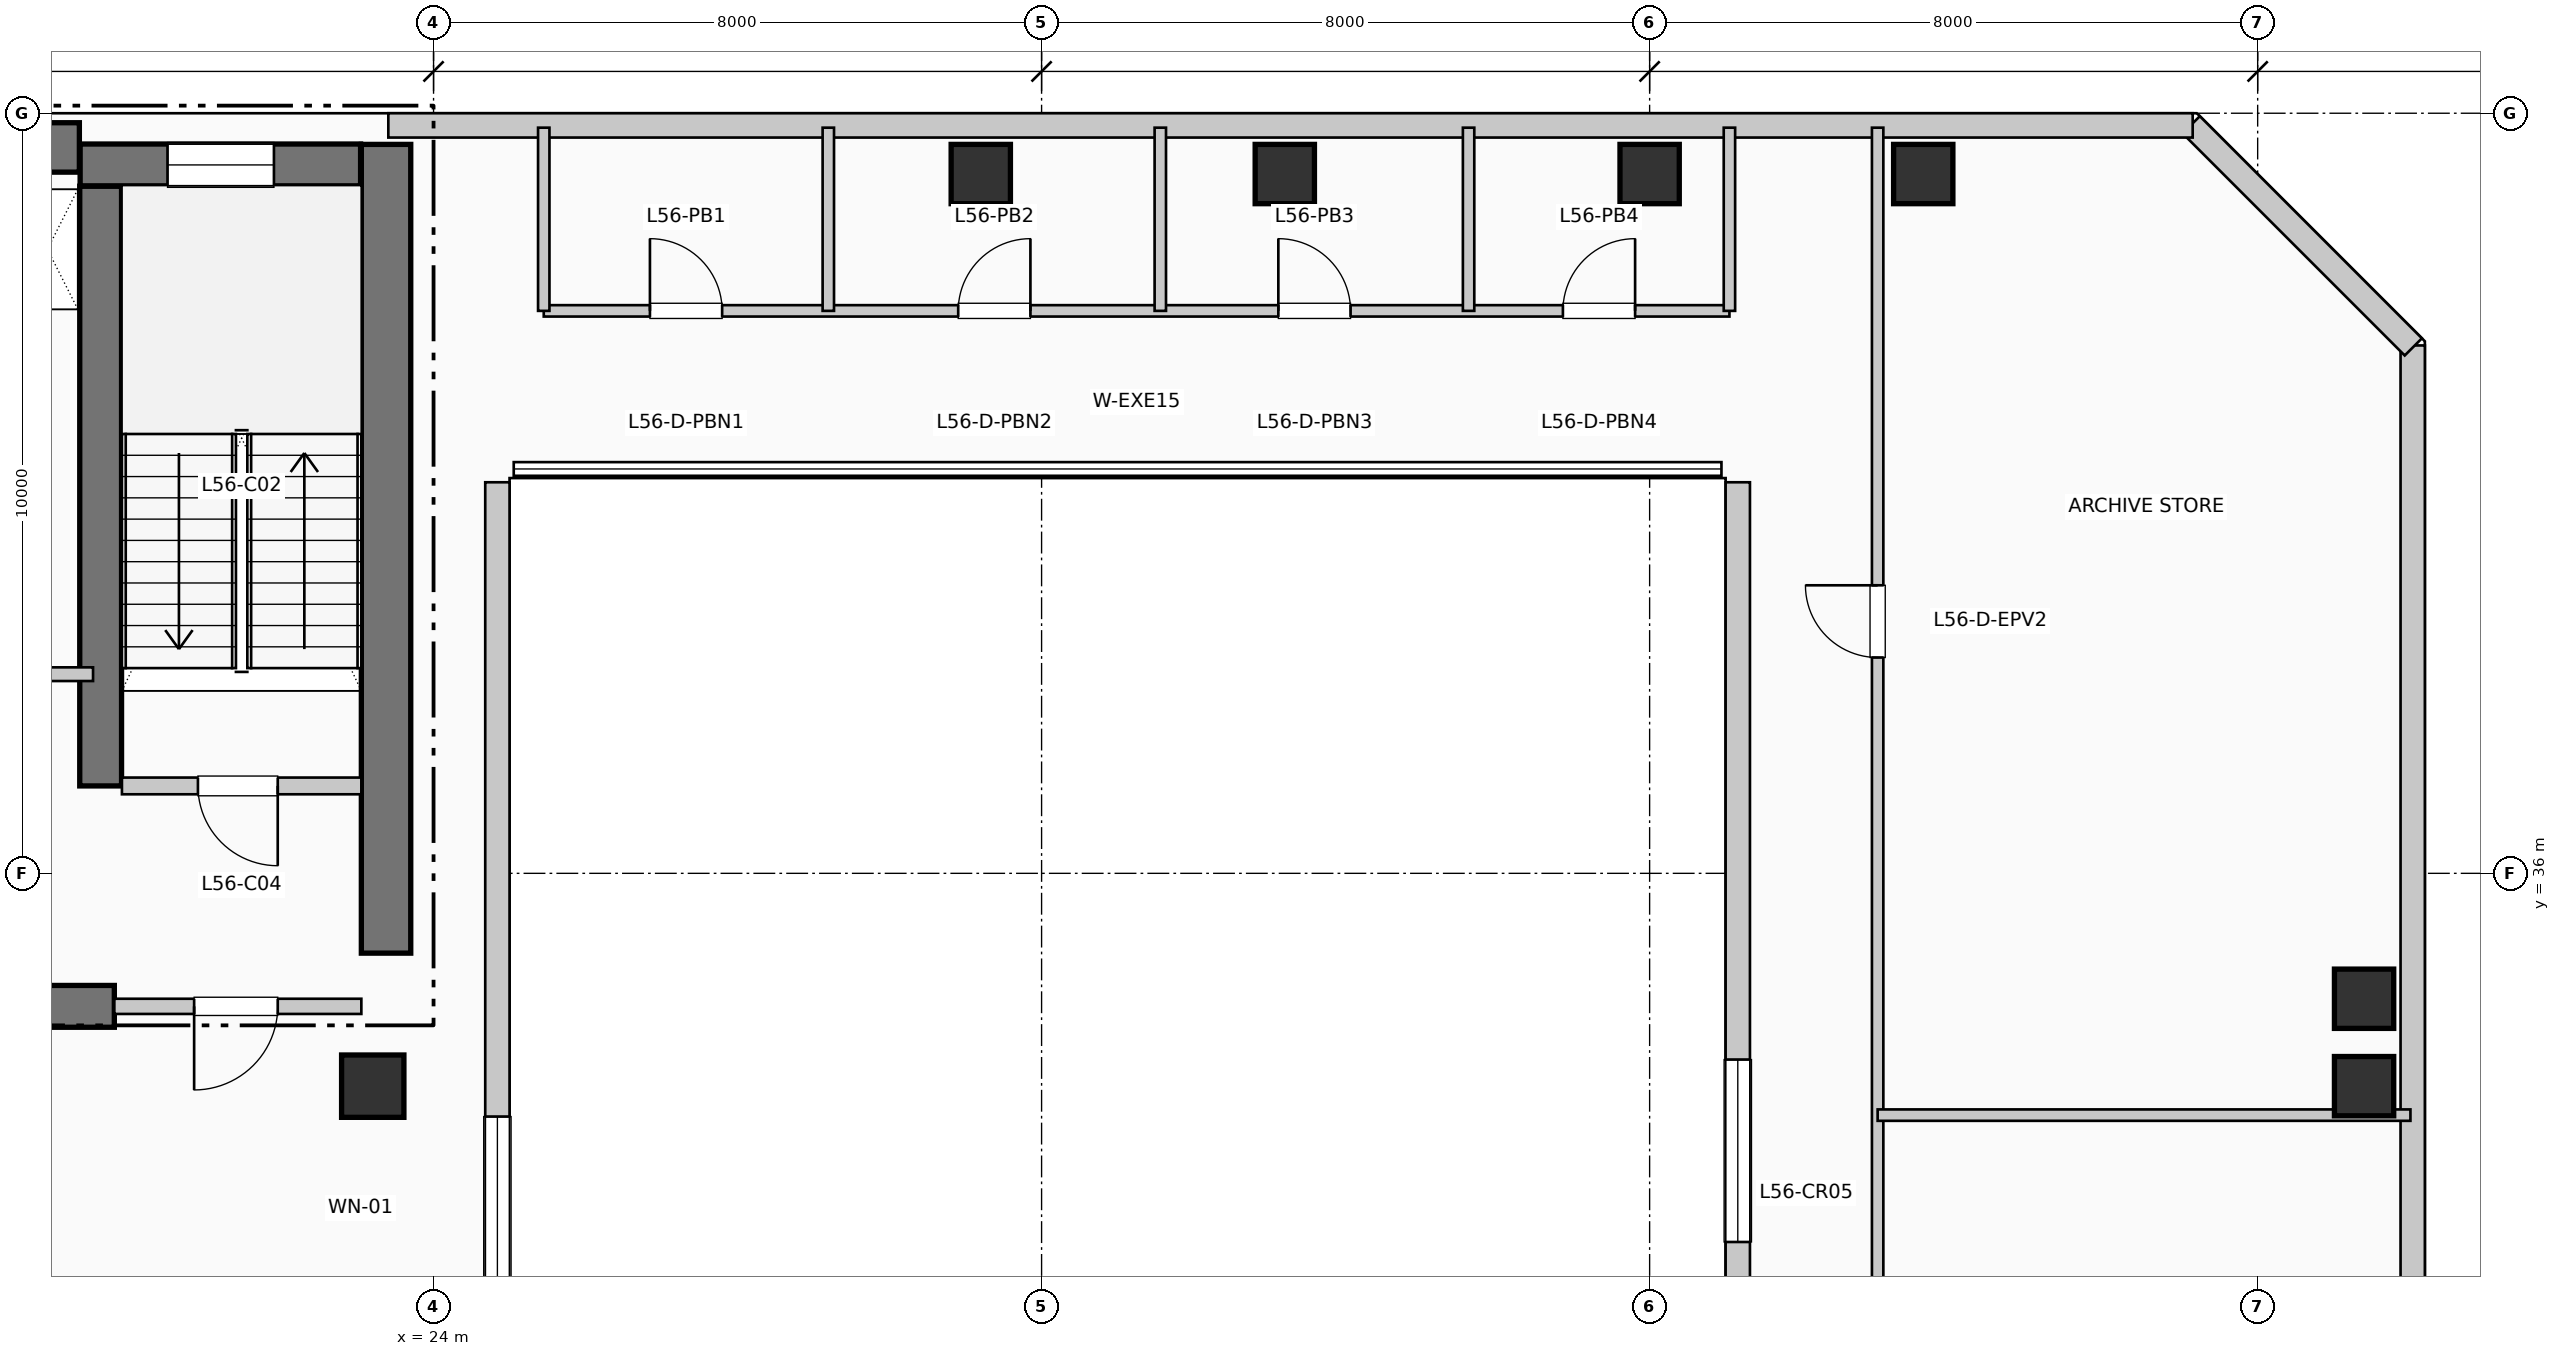
"""IFC4 building model, lengths in metres.
Left out: names, types, materials, properties, quantities, classifications, styles, units other than length and angle.
Written with IfcOpenShell. Run it as: python <this file> out.ifc"""

import sys

from ifc_helpers import new_model, si_unit, direction, frame, frame_2d, origin, origin_2d, place, context, subcontext, project, spatial, rectangle, extrude, element, fill, save


model = new_model("IFC4")
c1 = context("Model", 3, precision=1e-05, world=origin(), true_north=direction((0.0, 1.0)))
c2 = subcontext(c1, "Body", "Model", "MODEL_VIEW")
j1 = project(units=[si_unit("LENGTHUNIT", "METRE"), si_unit("PLANEANGLEUNIT", "RADIAN")], contexts=[c1])
p1 = place(None, origin())
s1 = spatial("IfcSite", under=j1, at=p1, CompositionType="ELEMENT")
p2 = place(p1, origin())
s2 = spatial("IfcBuilding", under=s1, at=p2, CompositionType="ELEMENT")
p3 = place(p2, frame((0.0, 0.0, 231.66)))
s3 = spatial("IfcBuildingStorey", under=s2, at=p3, CompositionType="ELEMENT", Elevation=231.66)
p4 = place(p3, frame((5.36, 45.55, 0.0), z_axis=(0.0, 0.0, 1.0), x_axis=(1.0, 0.0, 0.0)))
e1 = element("IfcWall", 1, at=p4, inside=s3, PredefinedType="SHEAR", context=c2, shape_type="SweptSolid", body=[
    extrude(rectangle(XDim=13.98, YDim=0.65, at=frame_2d((6.99, 0.0))), origin(), (0.0, 0.0, 1.0), 3.96),
])
p5 = place(p3, frame((23.375, 34.95, 0.0), z_axis=(0.0, 0.0, 1.0), x_axis=(0.0, 1.0, 0.0)))
e2 = element("IfcWall", 2, at=p5, inside=s3, PredefinedType="SHEAR", context=c2, shape_type="SweptSolid", body=[
    extrude(rectangle(XDim=10.64, YDim=0.65, at=frame_2d((5.32, 0.0))), origin(), (0.0, 0.0, 1.0), 3.96),
])
p6 = place(p3, frame((13.68, 34.25, 0.0), z_axis=(0.0, 0.0, 1.0), x_axis=(1.0, 0.0, 0.0)))
e3 = element("IfcWall", 3, at=p6, inside=s3, PredefinedType="SHEAR", context=c2, shape_type="SweptSolid", body=[
    extrude(rectangle(XDim=6.12, YDim=0.55, at=frame_2d((3.06, 0.0))), origin(), (0.0, 0.0, 1.0), 3.96),
])
p7 = place(p3, frame((19.62, 37.15, 0.0), z_axis=(0.0, 0.0, 1.0), x_axis=(0.0, 1.0, 0.0)))
e4 = element("IfcWall", 4, at=p7, inside=s3, PredefinedType="SHEAR", context=c2, shape_type="SweptSolid", body=[
    extrude(rectangle(XDim=7.89, YDim=0.55, at=frame_2d((3.945, 0.0))), origin(), (0.0, 0.0, 1.0), 3.96),
])
p8 = place(p3, frame((19.35, 45.32, 0.0), z_axis=(0.0, 0.0, 1.0), x_axis=(1.0, 0.0, 0.0)))
e5 = element("IfcWall", 5, at=p8, inside=s3, PredefinedType="SHEAR", context=c2, shape_type="SweptSolid", body=[
    extrude(rectangle(XDim=3.69, YDim=0.55, at=frame_2d((1.845, 0.0))), origin(), (0.0, 0.0, 1.0), 3.96),
])
p9 = place(p8, frame((1.15, 0.0, 1.05)))
e6 = element("IfcOpeningElement", 6, at=p9, cuts=e5, PredefinedType="OPENING", context=c2, shape_type="SweptSolid", body=[
    extrude(rectangle(XDim=1.4, YDim=1.8, at=frame_2d((0.7, 0.9))), frame((0.0, 0.285, 0.0), z_axis=(0.0, -1.0, 0.0), x_axis=(1.0, 0.0, 0.0)), (0.0, 0.0, 1.0), 0.57),
])
p10 = place(p3, frame((23.2, 33.2, 0.0), z_axis=(0.0, 0.0, 1.0), x_axis=(1.0, 0.0, 0.0)))
e7 = element("IfcColumn", 7, at=p10, inside=s3, PredefinedType="COLUMN", context=c2, shape_type="SweptSolid", body=[
    extrude(rectangle(XDim=0.82, YDim=0.82, at=origin_2d()), origin(), (0.0, 0.0, 1.0), 3.96),
])
for number, where, z_axis, x_axis in (
    (8, (31.2, 45.2, 0.0), (0.0, 0.0, 1.0), (1.0, 0.0, 0.0)),
    (9, (35.2, 45.2, 0.0), (0.0, 0.0, 1.0), (1.0, 0.0, 0.0)),
    (10, (40.0, 45.2, 0.0), (0.0, 0.0, 1.0), (1.0, 0.0, 0.0)),
    (11, (43.6, 45.2, 0.0), (0.0, 0.0, 1.0), (1.0, 0.0, 0.0)),
    (12, (49.4, 33.2, 0.0), (0.0, 0.0, 1.0), (1.0, 0.0, 0.0)),
    (13, (49.4, 34.35, 0.0), (0.0, 0.0, 1.0), (1.0, 0.0, 0.0)),
):
    element("IfcColumn", number, at=place(p3, frame(where, z_axis=z_axis, x_axis=x_axis)), inside=s3, PredefinedType="COLUMN", context=c2, shape_type="SweptSolid", body=[
        extrude(rectangle(XDim=0.78, YDim=0.78, at=origin_2d()), origin(), (0.0, 0.0, 1.0), 3.96),
    ])
p11 = place(p3, frame((24.84, 22.055, 0.0), z_axis=(0.0, 0.0, 1.0), x_axis=(0.0, 1.0, 0.0)))
e14 = element("IfcWall", 14, at=p11, inside=s3, PredefinedType="SOLIDWALL", context=c2, shape_type="SweptSolid", body=[
    extrude(rectangle(XDim=19.09, YDim=0.32, at=frame_2d((9.545, 0.0))), origin(), (0.0, 0.0, 1.0), 3.71),
])
p12 = place(p11, frame((8.345, 0.0, 0.85)))
e15 = element("IfcOpeningElement", 15, at=p12, cuts=e14, PredefinedType="OPENING", context=c2, shape_type="SweptSolid", body=[
    extrude(rectangle(XDim=2.4, YDim=2.05, at=frame_2d((1.2, 1.025))), frame((0.0, 0.17, 0.0), z_axis=(0.0, -1.0, 0.0), x_axis=(1.0, 0.0, 0.0)), (0.0, 0.0, 1.0), 0.34),
])
p13 = place(p3, frame((41.16, 41.145, 0.0), z_axis=(0.0, 0.0, 1.0), x_axis=(0.0, -1.0, 0.0)))
e16 = element("IfcWall", 16, at=p13, inside=s3, PredefinedType="SOLIDWALL", context=c2, shape_type="SweptSolid", body=[
    extrude(rectangle(XDim=17.59, YDim=0.32, at=frame_2d((8.795, 0.0))), origin(), (0.0, 0.0, 1.0), 3.71),
])
p14 = place(p13, frame((7.595, 0.0, 0.85)))
e17 = element("IfcOpeningElement", 17, at=p14, cuts=e16, PredefinedType="OPENING", context=c2, shape_type="SweptSolid", body=[
    extrude(rectangle(XDim=2.4, YDim=2.05, at=frame_2d((1.2, 1.025))), frame((0.0, 0.17, 0.0), z_axis=(0.0, -1.0, 0.0), x_axis=(1.0, 0.0, 0.0)), (0.0, 0.0, 1.0), 0.34),
])
p15 = place(p3, frame((50.04, 25.055, 0.0), z_axis=(0.0, 0.0, 1.0), x_axis=(0.0, 1.0, 0.0)))
e18 = element("IfcWall", 18, at=p15, inside=s3, PredefinedType="SOLIDWALL", context=c2, shape_type="SweptSolid", body=[
    extrude(rectangle(XDim=17.89, YDim=0.32, at=frame_2d((8.945, 0.0))), origin(), (0.0, 0.0, 1.0), 3.71),
])
p16 = place(p3, frame((50.048, 42.926, 0.0), z_axis=(0.0, 0.0, 1.0), x_axis=(-0.707136318428, 0.707077242712, 0.0)))
e19 = element("IfcWall", 19, at=p16, inside=s3, PredefinedType="SOLIDWALL", context=c2, shape_type="SweptSolid", body=[
    extrude(rectangle(XDim=4.133, YDim=0.32, at=frame_2d((2.066, 0.0))), origin(), (0.0, 0.0, 1.0), 3.71),
])
p17 = place(p3, frame((47.145, 45.84, 0.0), z_axis=(0.0, 0.0, 1.0), x_axis=(-1.0, 0.0, 0.0)))
e20 = element("IfcWall", 20, at=p17, inside=s3, PredefinedType="SOLIDWALL", context=c2, shape_type="SweptSolid", body=[
    extrude(rectangle(XDim=23.74, YDim=0.32, at=frame_2d((11.87, 0.0))), origin(), (0.0, 0.0, 1.0), 3.71),
])
p18 = place(p3, frame((19.9, 37.15, 0.0), z_axis=(0.0, 0.0, 1.0), x_axis=(1.0, 0.0, 0.0)))
e21 = element("IfcWall", 21, at=p18, inside=s3, PredefinedType="PARTITIONING", context=c2, shape_type="SweptSolid", body=[
    extrude(rectangle(XDim=3.15, YDim=0.22, at=frame_2d((1.575, 0.0))), origin(), (0.0, 0.0, 1.0), 3.71),
])
p19 = place(p18, frame((2.05, 0.0, 0.0), z_axis=(0.0, 0.0, 1.0), x_axis=(-1.0, 0.0, 0.0)))
e22 = element("IfcOpeningElement", 22, at=p19, cuts=e21, PredefinedType="OPENING", context=c2, shape_type="SweptSolid", body=[
    extrude(rectangle(XDim=1.05, YDim=2.15, at=frame_2d((0.525, 1.075))), frame((0.0, 0.12, 0.0), z_axis=(0.0, -1.0, 0.0), x_axis=(1.0, 0.0, 0.0)), (0.0, 0.0, 1.0), 0.24),
])
p20 = place(p3, frame((19.8, 34.25, 0.0), z_axis=(0.0, 0.0, 1.0), x_axis=(1.0, 0.0, 0.0)))
e23 = element("IfcWall", 23, at=p20, inside=s3, PredefinedType="PARTITIONING", context=c2, shape_type="SweptSolid", body=[
    extrude(rectangle(XDim=3.25, YDim=0.2, at=frame_2d((1.625, 0.0))), origin(), (0.0, 0.0, 1.0), 3.71),
])
p21 = place(p20, frame((2.15, 0.0, 0.0), z_axis=(0.0, 0.0, 1.0), x_axis=(-1.0, 0.0, 0.0)))
e24 = element("IfcOpeningElement", 24, at=p21, cuts=e23, PredefinedType="OPENING", context=c2, shape_type="SweptSolid", body=[
    extrude(rectangle(XDim=1.1, YDim=2.15, at=frame_2d((0.55, 1.075))), frame((0.0, 0.11, 0.0), z_axis=(0.0, -1.0, 0.0), x_axis=(1.0, 0.0, 0.0)), (0.0, 0.0, 1.0), 0.22),
])
p22 = place(p3, frame((17.68, 38.62, 0.0), z_axis=(0.0, 0.0, 1.0), x_axis=(1.0, 0.0, 0.0)))
e25 = element("IfcWall", 25, at=p22, inside=s3, PredefinedType="PARTITIONING", context=c2, shape_type="SweptSolid", body=[
    extrude(rectangle(XDim=1.84, YDim=0.18, at=frame_2d((0.92, 0.0))), origin(), (0.0, 0.0, 1.0), 3.71),
])
p23 = place(p22, frame((0.24, 0.0, 0.0)))
e26 = element("IfcOpeningElement", 26, at=p23, cuts=e25, PredefinedType="OPENING", context=c2, shape_type="SweptSolid", body=[
    extrude(rectangle(XDim=0.92, YDim=2.1, at=frame_2d((0.46, 1.05))), frame((0.0, 0.1, 0.0), z_axis=(0.0, -1.0, 0.0), x_axis=(1.0, 0.0, 0.0)), (0.0, 0.0, 1.0), 0.2),
])
p24 = place(p3, frame((25.45, 43.4, 0.0), z_axis=(0.0, 0.0, 1.0), x_axis=(1.0, 0.0, 0.0)))
e27 = element("IfcWall", 27, at=p24, inside=s3, PredefinedType="PARTITIONING", context=c2, shape_type="SweptSolid", body=[
    extrude(rectangle(XDim=15.6, YDim=0.15, at=frame_2d((7.8, 0.0))), origin(), (0.0, 0.0, 1.0), 3.71),
])
p25 = place(p24, frame((1.397, 0.0, 0.0)))
e28 = element("IfcOpeningElement", 28, at=p25, cuts=e27, PredefinedType="OPENING", context=c2, shape_type="SweptSolid", body=[
    extrude(rectangle(XDim=0.95, YDim=2.15, at=frame_2d((0.475, 1.075))), frame((0.0, 0.085, 0.0), z_axis=(0.0, -1.0, 0.0), x_axis=(1.0, 0.0, 0.0)), (0.0, 0.0, 1.0), 0.17),
])
p26 = place(p24, frame((5.453, 0.0, 0.0)))
e29 = element("IfcOpeningElement", 29, at=p26, cuts=e27, PredefinedType="OPENING", context=c2, shape_type="SweptSolid", body=[
    extrude(rectangle(XDim=0.95, YDim=2.15, at=frame_2d((0.475, 1.075))), frame((0.0, 0.085, 0.0), z_axis=(0.0, -1.0, 0.0), x_axis=(1.0, 0.0, 0.0)), (0.0, 0.0, 1.0), 0.17),
])
p27 = place(p24, frame((9.665, 0.0, 0.0)))
e30 = element("IfcOpeningElement", 30, at=p27, cuts=e27, PredefinedType="OPENING", context=c2, shape_type="SweptSolid", body=[
    extrude(rectangle(XDim=0.95, YDim=2.15, at=frame_2d((0.475, 1.075))), frame((0.0, 0.085, 0.0), z_axis=(0.0, -1.0, 0.0), x_axis=(1.0, 0.0, 0.0)), (0.0, 0.0, 1.0), 0.17),
])
p28 = place(p24, frame((13.409, 0.0, 0.0)))
e31 = element("IfcOpeningElement", 31, at=p28, cuts=e27, PredefinedType="OPENING", context=c2, shape_type="SweptSolid", body=[
    extrude(rectangle(XDim=0.95, YDim=2.15, at=frame_2d((0.475, 1.075))), frame((0.0, 0.085, 0.0), z_axis=(0.0, -1.0, 0.0), x_axis=(1.0, 0.0, 0.0)), (0.0, 0.0, 1.0), 0.17),
])
for number, where, z_axis, x_axis in (
    (32, (25.45, 43.4, 0.0), (0.0, 0.0, 1.0), (0.0, 1.0, 0.0)),
    (33, (41.05, 43.4, 0.0), (0.0, 0.0, 1.0), (0.0, 1.0, 0.0)),
    (34, (29.194, 43.4, 0.0), (0.0, 0.0, 1.0), (0.0, 1.0, 0.0)),
    (35, (33.562, 43.4, 0.0), (0.0, 0.0, 1.0), (0.0, 1.0, 0.0)),
    (36, (37.618, 43.4, 0.0), (0.0, 0.0, 1.0), (0.0, 1.0, 0.0)),
):
    element("IfcWall", number, at=place(p3, frame(where, z_axis=z_axis, x_axis=x_axis)), inside=s3, PredefinedType="PARTITIONING", context=c2, shape_type="SweptSolid", body=[
        extrude(rectangle(XDim=2.41, YDim=0.15, at=frame_2d((1.205, 0.0))), origin(), (0.0, 0.0, 1.0), 3.71),
    ])
p29 = place(p3, frame((43.0, 22.19, 0.0), z_axis=(0.0, 0.0, 1.0), x_axis=(0.0, 1.0, 0.0)))
e37 = element("IfcWall", 37, at=p29, inside=s3, PredefinedType="PARTITIONING", context=c2, shape_type="SweptSolid", body=[
    extrude(rectangle(XDim=23.62, YDim=0.15, at=frame_2d((11.81, 0.0))), origin(), (0.0, 0.0, 1.0), 3.71),
])
p30 = place(p29, frame((4.84, 0.0, 0.0)))
e38 = element("IfcOpeningElement", 38, at=p30, cuts=e37, PredefinedType="OPENING", context=c2, shape_type="SweptSolid", body=[
    extrude(rectangle(XDim=0.95, YDim=2.15, at=frame_2d((0.475, 1.075))), frame((0.0, 0.085, 0.0), z_axis=(0.0, -1.0, 0.0), x_axis=(1.0, 0.0, 0.0)), (0.0, 0.0, 1.0), 0.17),
])
p31 = place(p29, frame((16.649, 0.0, 0.0)))
e39 = element("IfcOpeningElement", 39, at=p31, cuts=e37, PredefinedType="OPENING", context=c2, shape_type="SweptSolid", body=[
    extrude(rectangle(XDim=0.95, YDim=2.15, at=frame_2d((0.475, 1.075))), frame((0.0, 0.085, 0.0), z_axis=(0.0, -1.0, 0.0), x_axis=(1.0, 0.0, 0.0)), (0.0, 0.0, 1.0), 0.17),
])
p32 = place(p3, frame((43.0, 32.819, 0.0), z_axis=(0.0, 0.0, 1.0), x_axis=(1.0, 0.0, 0.0)))
e40 = element("IfcWall", 40, at=p32, inside=s3, PredefinedType="PARTITIONING", context=c2, shape_type="SweptSolid", body=[
    extrude(rectangle(XDim=7.01, YDim=0.15, at=frame_2d((3.505, 0.0))), origin(), (0.0, 0.0, 1.0), 3.71),
])
p33 = place(p9, origin())
e41 = element("IfcWindow", 41, at=p33, inside=s3, PartitioningType="SINGLE_PANEL", PredefinedType="WINDOW", context=c2, shape_type="SweptSolid", body=[
    extrude(rectangle(XDim=1.4, YDim=1.8, at=frame_2d((0.7, 0.9))), frame((0.0, 0.03, 0.0), z_axis=(0.0, -1.0, 0.0), x_axis=(1.0, 0.0, 0.0)), (0.0, 0.0, 1.0), 0.06),
])
fill(e6, e41)
p34 = place(p12, origin())
e42 = element("IfcWindow", 42, at=p34, inside=s3, PartitioningType="SINGLE_PANEL", PredefinedType="WINDOW", context=c2, shape_type="SweptSolid", body=[
    extrude(rectangle(XDim=2.4, YDim=2.05, at=frame_2d((1.2, 1.025))), frame((0.0, 0.03, 0.0), z_axis=(0.0, -1.0, 0.0), x_axis=(1.0, 0.0, 0.0)), (0.0, 0.0, 1.0), 0.06),
])
fill(e15, e42)
p35 = place(p14, origin())
e43 = element("IfcWindow", 43, at=p35, inside=s3, PartitioningType="SINGLE_PANEL", PredefinedType="WINDOW", context=c2, shape_type="SweptSolid", body=[
    extrude(rectangle(XDim=2.4, YDim=2.05, at=frame_2d((1.2, 1.025))), frame((0.0, 0.03, 0.0), z_axis=(0.0, -1.0, 0.0), x_axis=(1.0, 0.0, 0.0)), (0.0, 0.0, 1.0), 0.06),
])
fill(e17, e43)
p36 = place(p19, origin())
e44 = element("IfcDoor", 44, at=p36, inside=s3, OperationType="SINGLE_SWING_RIGHT", PredefinedType="DOOR", context=c2, shape_type="SweptSolid", body=[
    extrude(rectangle(XDim=1.05, YDim=2.15, at=frame_2d((0.525, 1.075))), frame((0.0, 0.025, 0.0), z_axis=(0.0, -1.0, 0.0), x_axis=(1.0, 0.0, 0.0)), (0.0, 0.0, 1.0), 0.05),
])
fill(e22, e44)
p37 = place(p21, origin())
e45 = element("IfcDoor", 45, at=p37, inside=s3, OperationType="SINGLE_SWING_LEFT", PredefinedType="DOOR", context=c2, shape_type="SweptSolid", body=[
    extrude(rectangle(XDim=1.1, YDim=2.15, at=frame_2d((0.55, 1.075))), frame((0.0, 0.025, 0.0), z_axis=(0.0, -1.0, 0.0), x_axis=(1.0, 0.0, 0.0)), (0.0, 0.0, 1.0), 0.05),
])
fill(e24, e45)
p38 = place(p25, origin())
e46 = element("IfcDoor", 46, at=p38, inside=s3, OperationType="SINGLE_SWING_LEFT", PredefinedType="DOOR", context=c2, shape_type="SweptSolid", body=[
    extrude(rectangle(XDim=0.95, YDim=2.15, at=frame_2d((0.475, 1.075))), frame((0.0, 0.025, 0.0), z_axis=(0.0, -1.0, 0.0), x_axis=(1.0, 0.0, 0.0)), (0.0, 0.0, 1.0), 0.05),
])
fill(e28, e46)
p39 = place(p26, origin())
e47 = element("IfcDoor", 47, at=p39, inside=s3, OperationType="SINGLE_SWING_RIGHT", PredefinedType="DOOR", context=c2, shape_type="SweptSolid", body=[
    extrude(rectangle(XDim=0.95, YDim=2.15, at=frame_2d((0.475, 1.075))), frame((0.0, 0.025, 0.0), z_axis=(0.0, -1.0, 0.0), x_axis=(1.0, 0.0, 0.0)), (0.0, 0.0, 1.0), 0.05),
])
fill(e29, e47)
p40 = place(p27, origin())
e48 = element("IfcDoor", 48, at=p40, inside=s3, OperationType="SINGLE_SWING_LEFT", PredefinedType="DOOR", context=c2, shape_type="SweptSolid", body=[
    extrude(rectangle(XDim=0.95, YDim=2.15, at=frame_2d((0.475, 1.075))), frame((0.0, 0.025, 0.0), z_axis=(0.0, -1.0, 0.0), x_axis=(1.0, 0.0, 0.0)), (0.0, 0.0, 1.0), 0.05),
])
fill(e30, e48)
p41 = place(p28, origin())
e49 = element("IfcDoor", 49, at=p41, inside=s3, OperationType="SINGLE_SWING_RIGHT", PredefinedType="DOOR", context=c2, shape_type="SweptSolid", body=[
    extrude(rectangle(XDim=0.95, YDim=2.15, at=frame_2d((0.475, 1.075))), frame((0.0, 0.025, 0.0), z_axis=(0.0, -1.0, 0.0), x_axis=(1.0, 0.0, 0.0)), (0.0, 0.0, 1.0), 0.05),
])
fill(e31, e49)
p42 = place(p31, origin())
e50 = element("IfcDoor", 50, at=p42, inside=s3, OperationType="SINGLE_SWING_RIGHT", PredefinedType="DOOR", context=c2, shape_type="SweptSolid", body=[
    extrude(rectangle(XDim=0.95, YDim=2.15, at=frame_2d((0.475, 1.075))), frame((0.0, 0.025, 0.0), z_axis=(0.0, -1.0, 0.0), x_axis=(1.0, 0.0, 0.0)), (0.0, 0.0, 1.0), 0.05),
])
fill(e39, e50)
save(model, sys.argv[1])
